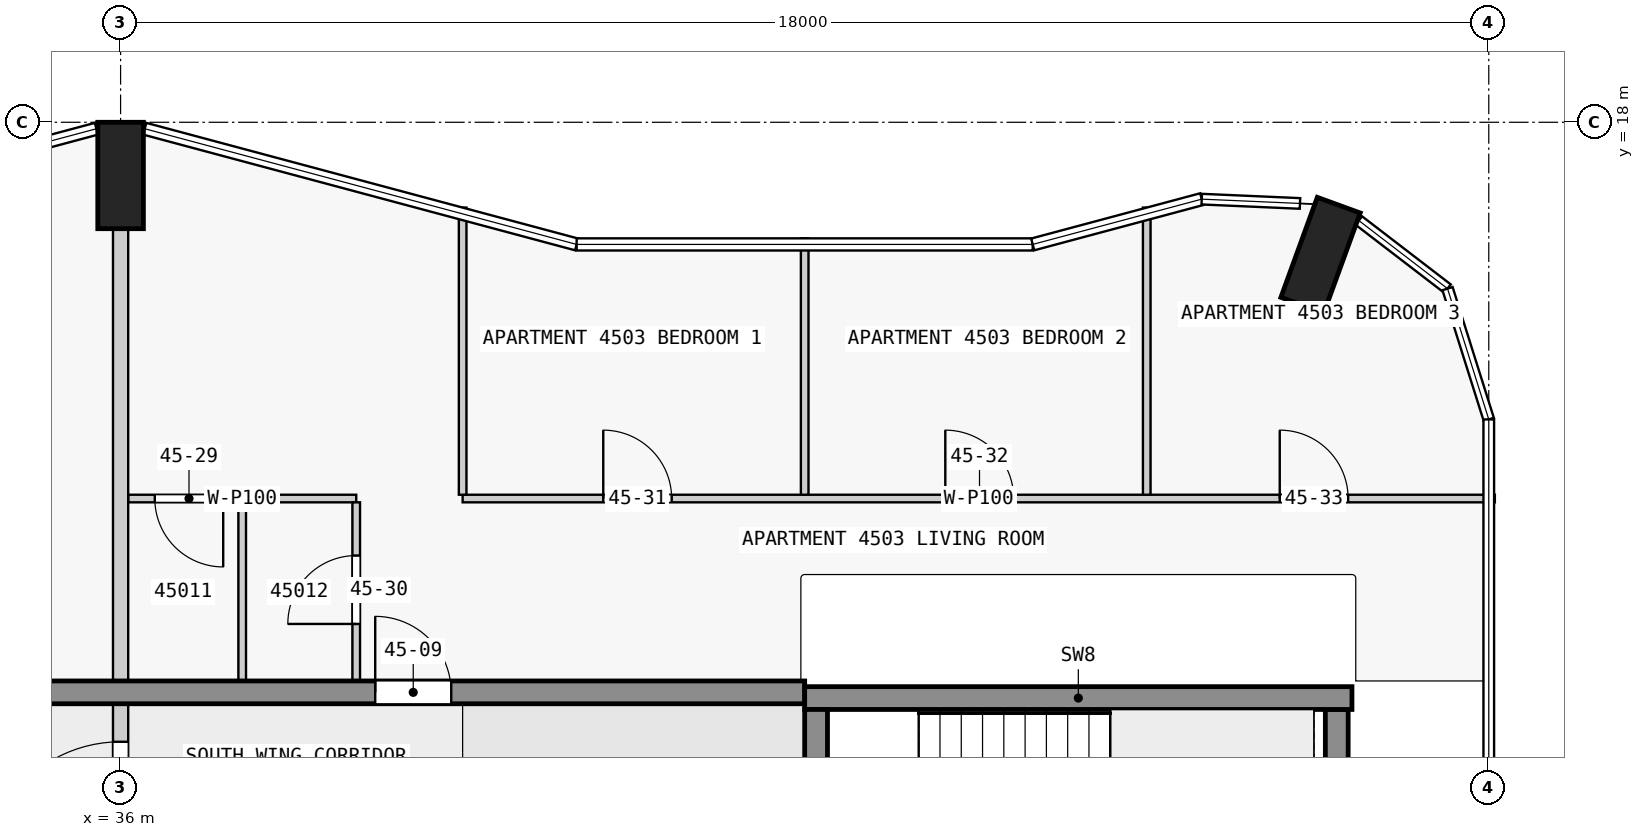
"""IFC4 building model, lengths in metres.
Left out: names, types, materials, properties, quantities, classifications, styles, units other than length and angle.
Written with IfcOpenShell. Run it as: python <this file> out.ifc"""

import sys

from ifc_helpers import new_model, si_unit, direction, frame, frame_2d, origin, origin_2d, place, context, subcontext, project, spatial, rectangle, extrude, element, fill, save


model = new_model("IFC4")
c1 = context("Model", 3, precision=1e-05, world=origin(), true_north=direction((0.0, 1.0)))
c2 = subcontext(c1, "Body", "Model", "MODEL_VIEW")
j1 = project(units=[si_unit("LENGTHUNIT", "METRE"), si_unit("PLANEANGLEUNIT", "RADIAN")], contexts=[c1])
p1 = place(None, origin())
s1 = spatial("IfcSite", under=j1, at=p1, CompositionType="ELEMENT")
p2 = place(p1, origin())
s2 = spatial("IfcBuilding", under=s1, at=p2, CompositionType="ELEMENT")
p3 = place(p2, frame((0.0, 0.0, 174.4)))
s3 = spatial("IfcBuildingStorey", under=s2, at=p3, CompositionType="ELEMENT", Elevation=174.4)
for number, where, z_axis, x_axis in (
    (1, (51.787, 16.252, 0.0), (0.0, 0.0, 1.0), (-0.94, 0.342, 0.0)),
    (2, (36.0, 17.3, 0.0), (0.0, 0.0, 1.0), (1.0, 0.0, 0.0)),
):
    element("IfcColumn", number, at=place(p3, frame(where, z_axis=z_axis, x_axis=x_axis)), inside=s3, PredefinedType="COLUMN", context=c2, shape_type="SweptSolid", body=[
        extrude(rectangle(XDim=0.6, YDim=1.4, at=origin_2d()), origin(), (0.0, 0.0, 1.0), 3.5),
    ])
p4 = place(p3, frame((45.15, 7.725, 0.0), z_axis=(0.0, 0.0, 1.0), x_axis=(0.0, 1.0, 0.0)))
e3 = element("IfcWall", 3, at=p4, inside=s3, PredefinedType="SHEAR", context=c2, shape_type="SweptSolid", body=[
    extrude(rectangle(XDim=2.55, YDim=0.3, at=frame_2d((1.275, 0.0))), origin(), (0.0, 0.0, 1.0), 3.5),
])
p5 = place(p4, frame((0.725, 0.0, 0.0)))
e4 = element("IfcOpeningElement", 4, at=p5, cuts=e3, PredefinedType="OPENING", context=c2, shape_type="SweptSolid", body=[
    extrude(rectangle(XDim=1.1, YDim=2.1, at=frame_2d((0.55, 1.05))), frame((0.0, 0.16, 0.0), z_axis=(0.0, -1.0, 0.0), x_axis=(1.0, 0.0, 0.0)), (0.0, 0.0, 1.0), 0.32),
])
p6 = place(p3, frame((52.0, 7.725, 0.0), z_axis=(0.0, 0.0, 1.0), x_axis=(0.0, 1.0, 0.0)))
e5 = element("IfcWall", 5, at=p6, inside=s3, PredefinedType="SHEAR", context=c2, shape_type="SweptSolid", body=[
    extrude(rectangle(XDim=2.55, YDim=0.3, at=frame_2d((1.275, 0.0))), origin(), (0.0, 0.0, 1.0), 3.5),
])
p7 = place(p3, frame((45.0, 10.425, 0.0), z_axis=(0.0, 0.0, 1.0), x_axis=(1.0, 0.0, 0.0)))
e6 = element("IfcWall", 6, at=p7, inside=s3, PredefinedType="SHEAR", context=c2, shape_type="SweptSolid", body=[
    extrude(rectangle(XDim=7.2, YDim=0.3, at=frame_2d((3.6, 0.0))), origin(), (0.0, 0.0, 1.0), 3.5),
])
p8 = place(p3, frame((22.5, 10.5, 0.0), z_axis=(0.0, 0.0, 1.0), x_axis=(1.0, 0.0, 0.0)))
e7 = element("IfcWall", 7, at=p8, inside=s3, PredefinedType="SHEAR", context=c2, shape_type="SweptSolid", body=[
    extrude(rectangle(XDim=22.5, YDim=0.3, at=frame_2d((11.25, 0.0))), origin(), (0.0, 0.0, 1.0), 3.25),
])
p9 = place(p8, frame((1.85, 0.0, 0.0)))
e8 = element("IfcOpeningElement", 8, at=p9, cuts=e7, PredefinedType="OPENING", context=c2, shape_type="SweptSolid", body=[
    extrude(rectangle(XDim=0.9, YDim=2.1, at=frame_2d((0.45, 1.05))), frame((0.0, 0.16, 0.0), z_axis=(0.0, -1.0, 0.0), x_axis=(1.0, 0.0, 0.0)), (0.0, 0.0, 1.0), 0.32),
])
p10 = place(p8, frame((6.25, 0.0, 0.0)))
e9 = element("IfcOpeningElement", 9, at=p10, cuts=e7, PredefinedType="OPENING", context=c2, shape_type="SweptSolid", body=[
    extrude(rectangle(XDim=1.0, YDim=2.1, at=frame_2d((0.5, 1.05))), frame((0.0, 0.16, 0.0), z_axis=(0.0, -1.0, 0.0), x_axis=(1.0, 0.0, 0.0)), (0.0, 0.0, 1.0), 0.32),
])
p11 = place(p8, frame((10.35, 0.0, 0.0)))
e10 = element("IfcOpeningElement", 10, at=p11, cuts=e7, PredefinedType="OPENING", context=c2, shape_type="SweptSolid", body=[
    extrude(rectangle(XDim=1.8, YDim=2.1, at=frame_2d((0.9, 1.05))), frame((0.0, 0.16, 0.0), z_axis=(0.0, -1.0, 0.0), x_axis=(1.0, 0.0, 0.0)), (0.0, 0.0, 1.0), 0.32),
])
p12 = place(p8, frame((16.85, 0.0, 0.0)))
e11 = element("IfcOpeningElement", 11, at=p12, cuts=e7, PredefinedType="OPENING", context=c2, shape_type="SweptSolid", body=[
    extrude(rectangle(XDim=1.0, YDim=2.1, at=frame_2d((0.5, 1.05))), frame((0.0, 0.16, 0.0), z_axis=(0.0, -1.0, 0.0), x_axis=(1.0, 0.0, 0.0)), (0.0, 0.0, 1.0), 0.32),
])
p13 = place(p3, frame((39.1, 13.05, 0.0), z_axis=(0.0, 0.0, 1.0), x_axis=(-1.0, 0.0, 0.0)))
e12 = element("IfcWall", 12, at=p13, inside=s3, PredefinedType="PARTITIONING", context=c2, shape_type="SweptSolid", body=[
    extrude(rectangle(XDim=3.0, YDim=0.1, at=frame_2d((1.5, 0.0))), origin(), (0.0, 0.0, 1.0), 3.25),
])
p14 = place(p13, frame((1.75, 0.0, 0.0)))
e13 = element("IfcOpeningElement", 13, at=p14, cuts=e12, PredefinedType="OPENING", context=c2, shape_type="SweptSolid", body=[
    extrude(rectangle(XDim=0.9, YDim=2.1, at=frame_2d((0.45, 1.05))), frame((0.0, 0.06, 0.0), z_axis=(0.0, -1.0, 0.0), x_axis=(1.0, 0.0, 0.0)), (0.0, 0.0, 1.0), 0.12),
])
p15 = place(p3, frame((40.5, 13.05, 0.0), z_axis=(0.0, 0.0, 1.0), x_axis=(1.0, 0.0, 0.0)))
e14 = element("IfcWall", 14, at=p15, inside=s3, PredefinedType="PARTITIONING", context=c2, shape_type="SweptSolid", body=[
    extrude(rectangle(XDim=13.58, YDim=0.1, at=frame_2d((6.79, 0.0))), origin(), (0.0, 0.0, 1.0), 3.25),
])
p16 = place(p15, frame((1.85, 0.0, 0.0)))
e15 = element("IfcOpeningElement", 15, at=p16, cuts=e14, PredefinedType="OPENING", context=c2, shape_type="SweptSolid", body=[
    extrude(rectangle(XDim=0.9, YDim=2.1, at=frame_2d((0.45, 1.05))), frame((0.0, 0.06, 0.0), z_axis=(0.0, -1.0, 0.0), x_axis=(1.0, 0.0, 0.0)), (0.0, 0.0, 1.0), 0.12),
])
p17 = place(p15, frame((6.35, 0.0, 0.0)))
e16 = element("IfcOpeningElement", 16, at=p17, cuts=e14, PredefinedType="OPENING", context=c2, shape_type="SweptSolid", body=[
    extrude(rectangle(XDim=0.9, YDim=2.1, at=frame_2d((0.45, 1.05))), frame((0.0, 0.06, 0.0), z_axis=(0.0, -1.0, 0.0), x_axis=(1.0, 0.0, 0.0)), (0.0, 0.0, 1.0), 0.12),
])
p18 = place(p15, frame((10.75, 0.0, 0.0)))
e17 = element("IfcOpeningElement", 17, at=p18, cuts=e14, PredefinedType="OPENING", context=c2, shape_type="SweptSolid", body=[
    extrude(rectangle(XDim=0.9, YDim=2.1, at=frame_2d((0.45, 1.05))), frame((0.0, 0.06, 0.0), z_axis=(0.0, -1.0, 0.0), x_axis=(1.0, 0.0, 0.0)), (0.0, 0.0, 1.0), 0.12),
])
p19 = place(p3, frame((36.0, 10.65, 0.0), z_axis=(0.0, 0.0, 1.0), x_axis=(0.0, 1.0, 0.0)))
e18 = element("IfcWall", 18, at=p19, inside=s3, PredefinedType="PARTITIONING", context=c2, shape_type="SweptSolid", body=[
    extrude(rectangle(XDim=5.95, YDim=0.2, at=frame_2d((2.975, 0.0))), origin(), (0.0, 0.0, 1.0), 3.25),
])
p20 = place(p3, frame((37.6, 10.65, 0.0), z_axis=(0.0, 0.0, 1.0), x_axis=(0.0, 1.0, 0.0)))
e19 = element("IfcWall", 19, at=p20, inside=s3, PredefinedType="PARTITIONING", context=c2, shape_type="SweptSolid", body=[
    extrude(rectangle(XDim=2.35, YDim=0.1, at=frame_2d((1.175, 0.0))), origin(), (0.0, 0.0, 1.0), 3.25),
])
p21 = place(p3, frame((39.1, 10.65, 0.0), z_axis=(0.0, 0.0, 1.0), x_axis=(0.0, 1.0, 0.0)))
e20 = element("IfcWall", 20, at=p21, inside=s3, PredefinedType="PARTITIONING", context=c2, shape_type="SweptSolid", body=[
    extrude(rectangle(XDim=2.35, YDim=0.1, at=frame_2d((1.175, 0.0))), origin(), (0.0, 0.0, 1.0), 3.25),
])
p22 = place(p21, frame((0.75, 0.0, 0.0)))
e21 = element("IfcOpeningElement", 21, at=p22, cuts=e20, PredefinedType="OPENING", context=c2, shape_type="SweptSolid", body=[
    extrude(rectangle(XDim=0.9, YDim=2.1, at=frame_2d((0.45, 1.05))), frame((0.0, 0.06, 0.0), z_axis=(0.0, -1.0, 0.0), x_axis=(1.0, 0.0, 0.0)), (0.0, 0.0, 1.0), 0.12),
])
p23 = place(p3, frame((40.5, 16.878, 0.0), z_axis=(0.0, 0.0, 1.0), x_axis=(0.0, -1.0, 0.0)))
e22 = element("IfcWall", 22, at=p23, inside=s3, PredefinedType="PARTITIONING", context=c2, shape_type="SweptSolid", body=[
    extrude(rectangle(XDim=3.778, YDim=0.1, at=frame_2d((1.889, 0.0))), origin(), (0.0, 0.0, 1.0), 3.25),
])
p24 = place(p3, frame((45.0, 13.1, 0.0), z_axis=(0.0, 0.0, 1.0), x_axis=(0.0, 1.0, 0.0)))
e23 = element("IfcWall", 23, at=p24, inside=s3, PredefinedType="PARTITIONING", context=c2, shape_type="SweptSolid", body=[
    extrude(rectangle(XDim=3.373, YDim=0.1, at=frame_2d((1.687, 0.0))), origin(), (0.0, 0.0, 1.0), 3.25),
])
p25 = place(p3, frame((49.5, 13.1, 0.0), z_axis=(0.0, 0.0, 1.0), x_axis=(0.0, 1.0, 0.0)))
e24 = element("IfcWall", 24, at=p25, inside=s3, PredefinedType="PARTITIONING", context=c2, shape_type="SweptSolid", body=[
    extrude(rectangle(XDim=3.778, YDim=0.1, at=frame_2d((1.889, 0.0))), origin(), (0.0, 0.0, 1.0), 3.25),
])
p26 = place(p3, frame((36.0, 7.35, 0.0), z_axis=(0.0, 0.0, 1.0), x_axis=(0.0, 1.0, 0.0)))
e25 = element("IfcWall", 25, at=p26, inside=s3, PredefinedType="PARTITIONING", context=c2, shape_type="SweptSolid", body=[
    extrude(rectangle(XDim=3.2, YDim=0.2, at=frame_2d((1.6, 0.0))), origin(), (0.0, 0.0, 1.0), 3.25),
])
p27 = place(p26, frame((0.7, 0.0, 0.0)))
e26 = element("IfcOpeningElement", 26, at=p27, cuts=e25, PredefinedType="OPENING", context=c2, shape_type="SweptSolid", body=[
    extrude(rectangle(XDim=1.8, YDim=2.1, at=frame_2d((0.9, 1.05))), frame((0.0, 0.11, 0.0), z_axis=(0.0, -1.0, 0.0), x_axis=(1.0, 0.0, 0.0)), (0.0, 0.0, 1.0), 0.22),
])
p28 = place(p12, origin())
e27 = element("IfcDoor", 27, at=p28, inside=s3, OperationType="SINGLE_SWING_RIGHT", PredefinedType="DOOR", context=c2, shape_type="SweptSolid", body=[
    extrude(rectangle(XDim=1.0, YDim=2.1, at=frame_2d((0.5, 1.05))), frame((0.0, 0.025, 0.0), z_axis=(0.0, -1.0, 0.0), x_axis=(1.0, 0.0, 0.0)), (0.0, 0.0, 1.0), 0.05),
])
fill(e11, e27)
p29 = place(p27, origin())
e28 = element("IfcDoor", 28, at=p29, inside=s3, OperationType="SINGLE_SWING_LEFT", PredefinedType="DOOR", context=c2, shape_type="SweptSolid", body=[
    extrude(rectangle(XDim=1.8, YDim=2.1, at=frame_2d((0.9, 1.05))), frame((0.0, 0.025, 0.0), z_axis=(0.0, -1.0, 0.0), x_axis=(1.0, 0.0, 0.0)), (0.0, 0.0, 1.0), 0.05),
])
fill(e26, e28)
p30 = place(p14, origin())
e29 = element("IfcDoor", 29, at=p30, inside=s3, OperationType="SINGLE_SWING_RIGHT", PredefinedType="DOOR", context=c2, shape_type="SweptSolid", body=[
    extrude(rectangle(XDim=0.9, YDim=2.1, at=frame_2d((0.45, 1.05))), frame((0.0, 0.025, 0.0), z_axis=(0.0, -1.0, 0.0), x_axis=(1.0, 0.0, 0.0)), (0.0, 0.0, 1.0), 0.05),
])
fill(e13, e29)
p31 = place(p22, origin())
e30 = element("IfcDoor", 30, at=p31, inside=s3, OperationType="SINGLE_SWING_RIGHT", PredefinedType="DOOR", context=c2, shape_type="SweptSolid", body=[
    extrude(rectangle(XDim=0.9, YDim=2.1, at=frame_2d((0.45, 1.05))), frame((0.0, 0.025, 0.0), z_axis=(0.0, -1.0, 0.0), x_axis=(1.0, 0.0, 0.0)), (0.0, 0.0, 1.0), 0.05),
])
fill(e21, e30)
p32 = place(p16, origin())
e31 = element("IfcDoor", 31, at=p32, inside=s3, OperationType="SINGLE_SWING_LEFT", PredefinedType="DOOR", context=c2, shape_type="SweptSolid", body=[
    extrude(rectangle(XDim=0.9, YDim=2.1, at=frame_2d((0.45, 1.05))), frame((0.0, 0.025, 0.0), z_axis=(0.0, -1.0, 0.0), x_axis=(1.0, 0.0, 0.0)), (0.0, 0.0, 1.0), 0.05),
])
fill(e15, e31)
p33 = place(p17, origin())
e32 = element("IfcDoor", 32, at=p33, inside=s3, OperationType="SINGLE_SWING_RIGHT", PredefinedType="DOOR", context=c2, shape_type="SweptSolid", body=[
    extrude(rectangle(XDim=0.9, YDim=2.1, at=frame_2d((0.45, 1.05))), frame((0.0, 0.025, 0.0), z_axis=(0.0, -1.0, 0.0), x_axis=(1.0, 0.0, 0.0)), (0.0, 0.0, 1.0), 0.05),
])
fill(e16, e32)
p34 = place(p18, origin())
e33 = element("IfcDoor", 33, at=p34, inside=s3, OperationType="SINGLE_SWING_RIGHT", PredefinedType="DOOR", context=c2, shape_type="SweptSolid", body=[
    extrude(rectangle(XDim=0.9, YDim=2.1, at=frame_2d((0.45, 1.05))), frame((0.0, 0.025, 0.0), z_axis=(0.0, -1.0, 0.0), x_axis=(1.0, 0.0, 0.0)), (0.0, 0.0, 1.0), 0.05),
])
fill(e17, e33)
save(model, sys.argv[1])
